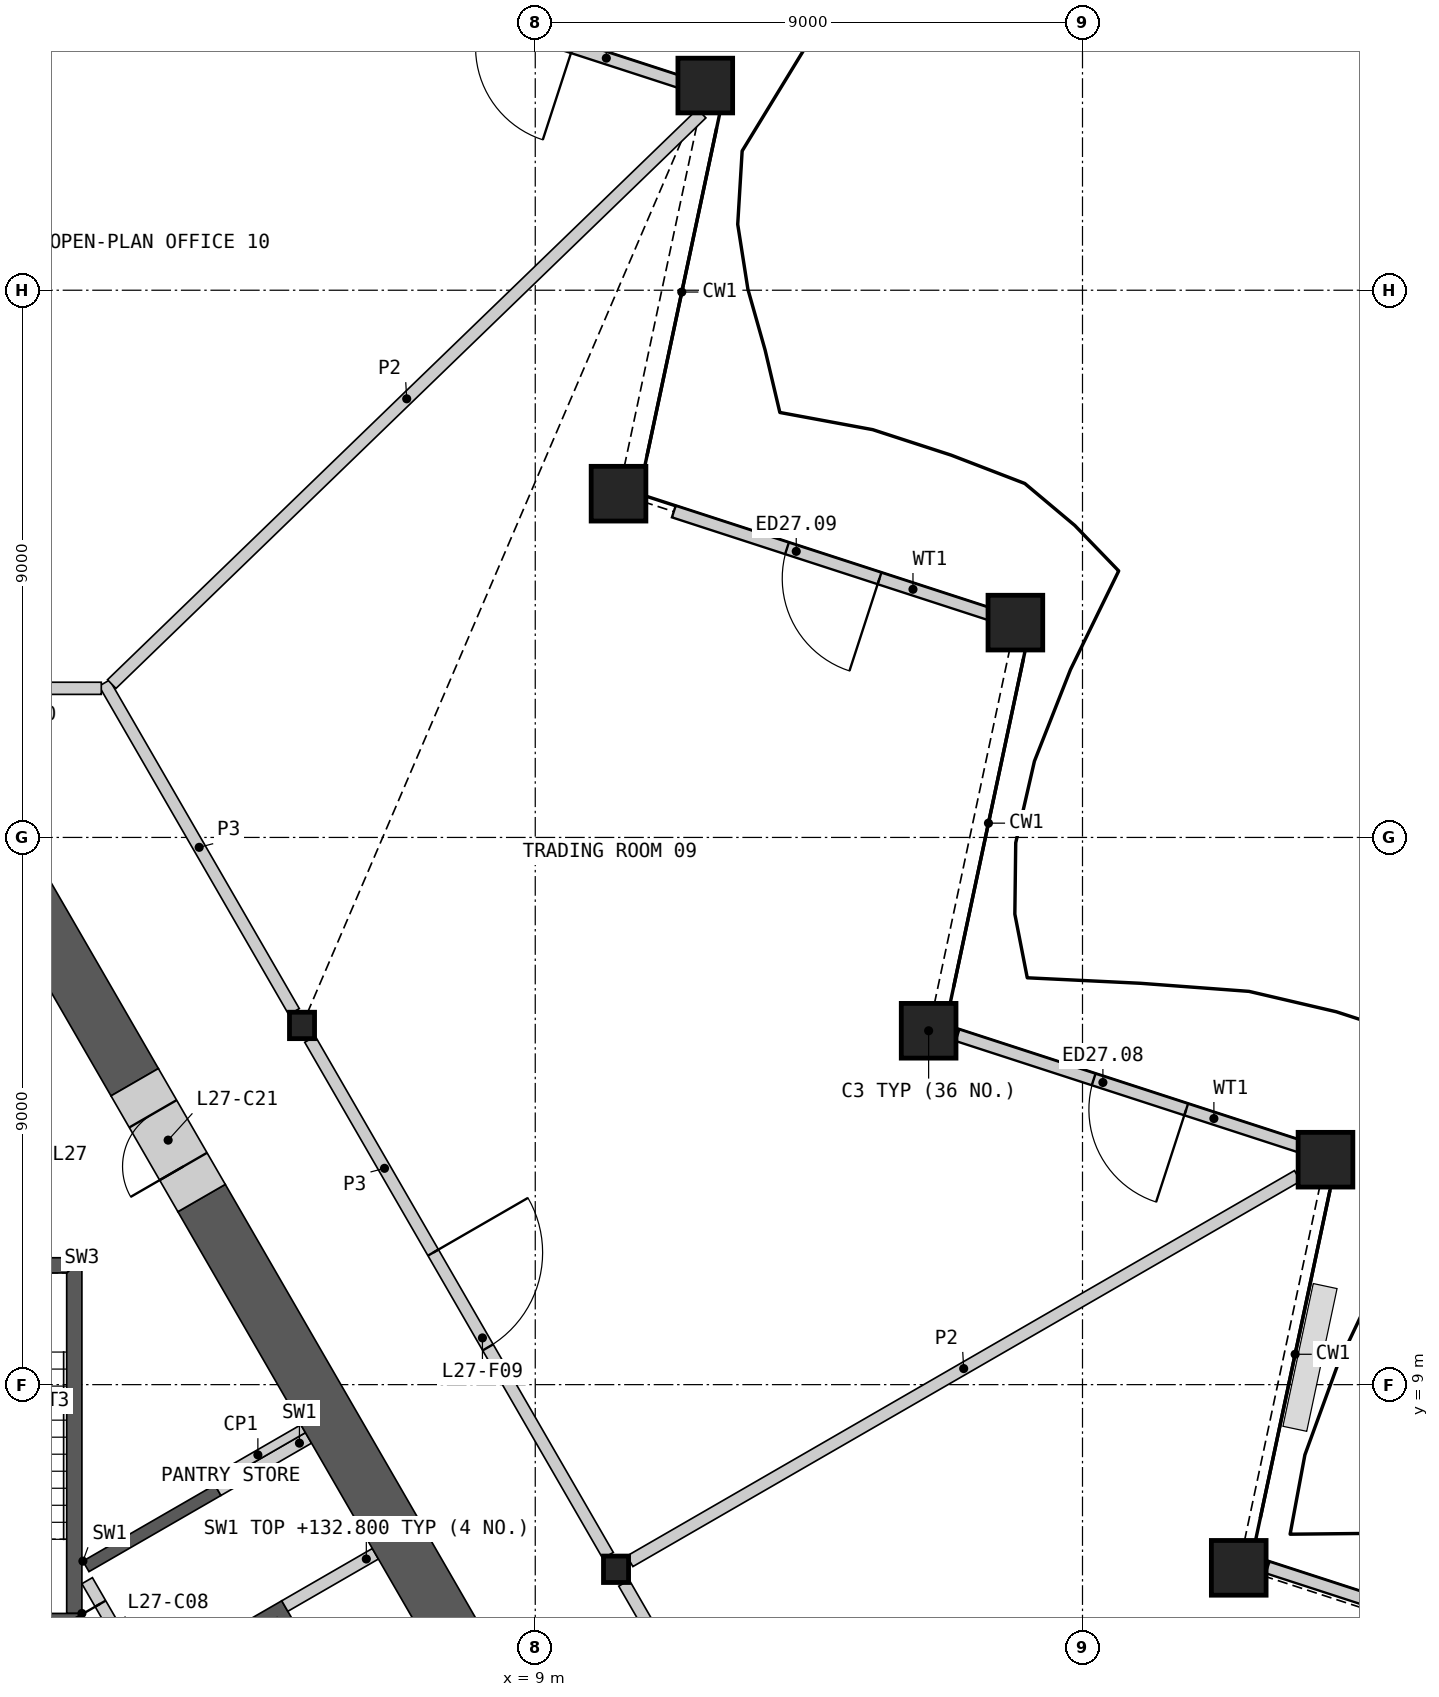
"""IFC4 building model, lengths in metres.
Left out: names, types, materials, properties, quantities, classifications, styles, units other than length and angle.
Written with IfcOpenShell. Run it as: python <this file> out.ifc"""

import sys

from ifc_helpers import new_model, si_unit, direction, frame, frame_2d, origin, origin_2d, place, context, subcontext, project, spatial, polyline, rectangle, hollow_rectangle, i_section, outline, extrude, element, fill, save


model = new_model("IFC4")
c1 = context("Model", 3, precision=1e-05, world=origin(), true_north=direction((0.0, 1.0)))
c2 = subcontext(c1, "Body", "Model", "MODEL_VIEW")
j1 = project(units=[si_unit("LENGTHUNIT", "METRE"), si_unit("PLANEANGLEUNIT", "RADIAN")], contexts=[c1])
p1 = place(None, origin())
s1 = spatial("IfcSite", under=j1, at=p1, CompositionType="ELEMENT")
p2 = place(p1, origin())
s2 = spatial("IfcBuilding", under=s1, at=p2, CompositionType="ELEMENT")
p3 = place(p2, frame((0.0, 0.0, 129.0)))
s3 = spatial("IfcBuildingStorey", under=s2, at=p3, CompositionType="ELEMENT", Elevation=129.0)
for number, where, z_axis, x_axis in (
    (1, (20.57, 5.987, 0.0), (0.0, 0.0, 1.0), (1.0, 0.0, 0.0)),
    (2, (21.996, 12.699, 0.0), (0.0, 0.0, 1.0), (1.0, 0.0, 0.0)),
    (3, (15.469, 14.82, 0.0), (0.0, 0.0, 1.0), (1.0, 0.0, 0.0)),
    (4, (16.896, 21.533, 0.0), (0.0, 0.0, 1.0), (1.0, 0.0, 0.0)),
    (5, (10.37, 23.654, 0.0), (0.0, 0.0, 1.0), (1.0, 0.0, 0.0)),
    (6, (11.796, 30.366, 0.0), (0.0, 0.0, 1.0), (1.0, 0.0, 0.0)),
):
    element("IfcColumn", number, at=place(p3, frame(where, z_axis=z_axis, x_axis=x_axis)), inside=s3, PredefinedType="COLUMN", context=c2, shape_type="SweptSolid", body=[
        extrude(hollow_rectangle(XDim=0.9, YDim=0.9, WallThickness=0.06, at=origin_2d()), origin(), (0.0, 0.0, 1.0), 4.2),
    ])
for number, where, z_axis, x_axis in (
    (7, (10.328, 5.963, 0.0), (0.0, 0.0, 1.0), (1.0, 0.0, 0.0)),
    (8, (5.164, 14.908, 0.0), (0.0, 0.0, 1.0), (1.0, 0.0, 0.0)),
):
    element("IfcColumn", number, at=place(p3, frame(where, z_axis=z_axis, x_axis=x_axis)), inside=s3, PredefinedType="COLUMN", context=c2, shape_type="SweptSolid", body=[
        extrude(i_section(OverallWidth=0.412, OverallDepth=0.435, WebThickness=0.036, FlangeThickness=0.057, at=origin_2d()), origin(), (0.0, 0.0, 1.0), 4.2),
    ])
p4 = place(p3, frame((26.622, 4.181, 0.0), z_axis=(0.0, 0.0, 1.0), x_axis=(-0.951053952554, 0.309024884649, 0.0)))
e9 = element("IfcWall", 9, at=p4, inside=s3, PredefinedType="SOLIDWALL", context=c2, shape_type="SweptSolid", body=[
    extrude(rectangle(XDim=5.865, YDim=0.2, at=frame_2d((2.932, 0.0))), origin(), (0.0, 0.0, 1.0), 3.189),
])
p5 = place(p4, frame((1.969, 0.0, 0.0)))
e10 = element("IfcOpeningElement", 10, at=p5, cuts=e9, PredefinedType="OPENING", context=c2, shape_type="SweptSolid", body=[
    extrude(rectangle(XDim=1.6, YDim=2.4, at=frame_2d((0.8, 1.2))), frame((0.0, 0.11, 0.0), z_axis=(0.0, -1.0, 0.0), x_axis=(1.0, 0.0, 0.0)), (0.0, 0.0, 1.0), 0.22),
])
p6 = place(p3, frame((21.567, 12.92, 0.0), z_axis=(0.0, 0.0, 1.0), x_axis=(-0.951051366173, 0.309032844373, 0.0)))
e11 = element("IfcWall", 11, at=p6, inside=s3, PredefinedType="SOLIDWALL", context=c2, shape_type="SweptSolid", body=[
    extrude(rectangle(XDim=5.912, YDim=0.2, at=frame_2d((2.956, 0.0))), origin(), (0.0, 0.0, 1.0), 3.189),
])
p7 = place(p6, frame((1.957, 0.0, 0.0)))
e12 = element("IfcOpeningElement", 12, at=p7, cuts=e11, PredefinedType="OPENING", context=c2, shape_type="SweptSolid", body=[
    extrude(rectangle(XDim=1.6, YDim=2.4, at=frame_2d((0.8, 1.2))), frame((0.0, 0.11, 0.0), z_axis=(0.0, -1.0, 0.0), x_axis=(1.0, 0.0, 0.0)), (0.0, 0.0, 1.0), 0.22),
])
p8 = place(p3, frame((16.523, 21.655, 0.0), z_axis=(0.0, 0.0, 1.0), x_axis=(-0.951055539332, 0.309020001142, 0.0)))
e13 = element("IfcWall", 13, at=p8, inside=s3, PredefinedType="SOLIDWALL", context=c2, shape_type="SweptSolid", body=[
    extrude(rectangle(XDim=5.515, YDim=0.2, at=frame_2d((2.757, 0.0))), origin(), (0.0, 0.0, 1.0), 3.189),
])
p9 = place(p8, frame((1.957, 0.0, 0.0)))
e14 = element("IfcOpeningElement", 14, at=p9, cuts=e13, PredefinedType="OPENING", context=c2, shape_type="SweptSolid", body=[
    extrude(rectangle(XDim=1.6, YDim=2.4, at=frame_2d((0.8, 1.2))), frame((0.0, 0.11, 0.0), z_axis=(0.0, -1.0, 0.0), x_axis=(1.0, 0.0, 0.0)), (0.0, 0.0, 1.0), 0.22),
])
p10 = place(p3, frame((11.48, 30.391, 0.0), z_axis=(0.0, 0.0, 1.0), x_axis=(-0.951055539332, 0.309020001142, 0.0)))
e15 = element("IfcWall", 15, at=p10, inside=s3, PredefinedType="SOLIDWALL", context=c2, shape_type="SweptSolid", body=[
    extrude(rectangle(XDim=5.515, YDim=0.2, at=frame_2d((2.757, 0.0))), origin(), (0.0, 0.0, 1.0), 3.189),
])
p11 = place(p10, frame((1.957, 0.0, 0.0)))
e16 = element("IfcOpeningElement", 16, at=p11, cuts=e15, PredefinedType="OPENING", context=c2, shape_type="SweptSolid", body=[
    extrude(rectangle(XDim=1.6, YDim=2.4, at=frame_2d((0.8, 1.2))), frame((0.0, 0.11, 0.0), z_axis=(0.0, -1.0, 0.0), x_axis=(1.0, 0.0, 0.0)), (0.0, 0.0, 1.0), 0.22),
])
p12 = place(p3, origin())
e17 = element("IfcWall", 17, at=p12, inside=s3, PredefinedType="SHEAR", context=c2, shape_type="SweptSolid", body=[
    extrude(outline(polyline([(1.561, 6.097), (3.731, 7.35), (3.831, 7.177), (1.66, 5.924), (1.561, 6.097)])), origin(), (0.0, 0.0, 1.0), 3.8),
])
p13 = place(p3, origin())
e18 = element("IfcWall", 18, at=p13, inside=s3, PredefinedType="SHEAR", context=c2, shape_type="SweptSolid", body=[
    extrude(outline(polyline([(2.66, 4.192), (4.831, 5.445), (8.231, -0.444), (6.061, -1.697), (5.96, -1.524), (7.952, -0.374), (6.952, 1.358), (4.96, 0.208), (4.861, 0.381), (6.852, 1.531), (5.852, 3.263), (3.861, 2.113), (3.76, 2.287), (5.752, 3.437), (4.752, 5.169), (2.76, 4.019), (2.66, 4.192)])), origin(), (0.0, 0.0, 1.0), 3.8),
])
p14 = place(p3, frame((5.817, -1.476, 0.0), z_axis=(0.0, 0.0, 1.0), x_axis=(-0.500002616675, 0.866023893041, 0.0)))
e19 = element("IfcWall", 19, at=p14, inside=s3, PredefinedType="SOLIDWALL", context=c2, shape_type="SweptSolid", body=[
    extrude(rectangle(XDim=8.373, YDim=0.2, at=frame_2d((4.187, 0.0))), origin(), (0.0, 0.0, 1.0), 3.8),
])
p15 = place(p14, frame((0.337, 0.0, 0.0)))
e20 = element("IfcOpeningElement", 20, at=p15, cuts=e19, PredefinedType="OPENING", context=c2, shape_type="SweptSolid", body=[
    extrude(rectangle(XDim=1.1, YDim=2.1, at=frame_2d((0.55, 1.05))), frame((0.0, 0.11, 0.0), z_axis=(0.0, -1.0, 0.0), x_axis=(1.0, 0.0, 0.0)), (0.0, 0.0, 1.0), 0.22),
])
p16 = place(p14, frame((2.537, 0.0, 0.0)))
e21 = element("IfcOpeningElement", 21, at=p16, cuts=e19, PredefinedType="OPENING", context=c2, shape_type="SweptSolid", body=[
    extrude(rectangle(XDim=1.1, YDim=2.1, at=frame_2d((0.55, 1.05))), frame((0.0, 0.11, 0.0), z_axis=(0.0, -1.0, 0.0), x_axis=(1.0, 0.0, 0.0)), (0.0, 0.0, 1.0), 0.22),
])
p17 = place(p14, frame((4.737, 0.0, 0.0)))
e22 = element("IfcOpeningElement", 22, at=p17, cuts=e19, PredefinedType="OPENING", context=c2, shape_type="SweptSolid", body=[
    extrude(rectangle(XDim=1.1, YDim=2.1, at=frame_2d((0.55, 1.05))), frame((0.0, 0.11, 0.0), z_axis=(0.0, -1.0, 0.0), x_axis=(1.0, 0.0, 0.0)), (0.0, 0.0, 1.0), 0.22),
])
p18 = place(p14, frame((7.037, 0.0, 0.0)))
e23 = element("IfcOpeningElement", 23, at=p18, cuts=e19, PredefinedType="OPENING", context=c2, shape_type="SweptSolid", body=[
    extrude(rectangle(XDim=0.9, YDim=2.1, at=frame_2d((0.45, 1.05))), frame((0.0, 0.11, 0.0), z_axis=(0.0, -1.0, 0.0), x_axis=(1.0, 0.0, 0.0)), (0.0, 0.0, 1.0), 0.22),
])
for number, where, z_axis, x_axis in (
    (24, (4.881, 5.358, 0.0), (0.0, 0.0, 1.0), (0.866, 0.5, 0.0)),
    (25, (3.781, 7.263, 0.0), (0.0, 0.0, 1.0), (0.866, 0.5, 0.0)),
):
    element("IfcWall", number, at=place(p3, frame(where, z_axis=z_axis, x_axis=x_axis)), inside=s3, PredefinedType="SHEAR", context=c2, shape_type="SweptSolid", body=[
        extrude(rectangle(XDim=1.72, YDim=0.2, at=frame_2d((0.86, 0.0))), origin(), (0.0, 0.0, 1.0), 3.8),
    ])
p19 = place(p3, origin())
e26 = element("IfcWall", 26, at=p19, inside=s3, PredefinedType="SHEAR", context=c2, shape_type="SweptSolid", body=[
    extrude(outline(polyline([(1.544, 5.237), (1.544, 11.087), (1.294, 10.837), (1.294, 5.237), (1.544, 5.237)])), origin(), (0.0, 0.0, 1.0), 3.8),
])
p20 = place(p3, origin())
e27 = element("IfcWall", 27, at=p20, inside=s3, PredefinedType="SHEAR", context=c2, shape_type="SweptSolid", body=[
    extrude(outline(polyline([(1.544, 11.087), (-1.544, 11.087), (-1.294, 10.837), (1.294, 10.837), (1.544, 11.087)])), origin(), (0.0, 0.0, 1.0), 3.8),
])
p21 = place(p3, frame((1.544, 5.112, 0.0), z_axis=(0.0, 0.0, 1.0), x_axis=(-1.0, 0.0, 0.0)))
e28 = element("IfcWall", 28, at=p21, inside=s3, PredefinedType="SHEAR", context=c2, shape_type="SweptSolid", body=[
    extrude(rectangle(XDim=3.088, YDim=0.25, at=frame_2d((1.544, 0.0))), origin(), (0.0, 0.0, 1.0), 3.8),
])
p22 = place(p21, frame((0.994, 0.0, 0.0)))
e29 = element("IfcOpeningElement", 29, at=p22, cuts=e28, PredefinedType="OPENING", context=c2, shape_type="SweptSolid", body=[
    extrude(rectangle(XDim=1.1, YDim=2.1, at=frame_2d((0.55, 1.05))), frame((0.0, 0.135, 0.0), z_axis=(0.0, -1.0, 0.0), x_axis=(1.0, 0.0, 0.0)), (0.0, 0.0, 1.0), 0.27),
])
p23 = place(p3, frame((3.693, 7.415, 0.0), z_axis=(0.0, 0.0, 1.0), x_axis=(0.866024871741, 0.500000921525, 0.0)))
e30 = element("IfcWall", 30, at=p23, inside=s3, PredefinedType="PARTITIONING", context=c2, shape_type="SweptSolid", body=[
    extrude(rectangle(XDim=1.72, YDim=0.15, at=frame_2d((0.86, 0.0))), origin(), (0.0, 0.0, 1.0), 3.8),
])
p24 = place(p3, frame((7.91, 4.451, 0.0), z_axis=(0.0, 0.0, 1.0), x_axis=(-0.500001962043, 0.866024270995, 0.0)))
e31 = element("IfcWall", 31, at=p24, inside=s3, PredefinedType="SHEAR", context=c2, shape_type="SweptSolid", body=[
    extrude(rectangle(XDim=8.796, YDim=0.9, at=frame_2d((4.398, 0.0))), origin(), (0.0, 0.0, 1.0), 3.8),
])
p25 = place(p3, frame((2.413, 13.974, 0.0), z_axis=(0.0, 0.0, 1.0), x_axis=(-0.500046330384, 0.865998653272, 0.0)))
e32 = element("IfcWall", 32, at=p25, inside=s3, PredefinedType="SHEAR", context=c2, shape_type="SweptSolid", body=[
    extrude(rectangle(XDim=4.045, YDim=0.9, at=frame_2d((2.023, 0.0))), origin(), (0.0, 0.0, 1.0), 3.8),
])
p26 = place(p3, frame((3.512, 12.069, 0.0), z_axis=(0.0, 0.0, 1.0), x_axis=(-0.499946605688, 0.86605622881, 0.0)))
e33 = element("IfcWall", 33, at=p26, inside=s3, PredefinedType="SHEAR", context=c2, shape_type="SweptSolid", body=[
    extrude(rectangle(XDim=2.2, YDim=0.9, at=frame_2d((1.1, 0.0))), origin(), (0.0, 0.0, 1.0), 3.8),
])
p27 = place(p26, frame((0.6, 0.0, 0.0)))
e34 = element("IfcOpeningElement", 34, at=p27, cuts=e33, PredefinedType="OPENING", context=c2, shape_type="SweptSolid", body=[
    extrude(rectangle(XDim=1.0, YDim=2.1, at=frame_2d((0.5, 1.05))), frame((0.0, 0.46, 0.0), z_axis=(0.0, -1.0, 0.0), x_axis=(1.0, 0.0, 0.0)), (0.0, 0.0, 1.0), 0.92),
])
p28 = place(p3, frame((10.46, 5.736, 0.0), z_axis=(0.0, 0.0, 1.0), x_axis=(0.500004141693, -0.866023012564, 0.0)))
e35 = element("IfcWall", 35, at=p28, inside=s3, PredefinedType="PARTITIONING", context=c2, shape_type="SweptSolid", body=[
    extrude(rectangle(XDim=9.803, YDim=0.2, at=frame_2d((4.902, 0.0))), origin(), (0.0, 0.0, 1.0), 3.8),
])
p29 = place(p28, frame((4.352, 0.0, 0.0)))
e36 = element("IfcOpeningElement", 36, at=p29, cuts=e35, PredefinedType="OPENING", context=c2, shape_type="SweptSolid", body=[
    extrude(rectangle(XDim=1.0, YDim=2.1, at=frame_2d((0.5, 1.05))), frame((0.0, 0.11, 0.0), z_axis=(0.0, -1.0, 0.0), x_axis=(1.0, 0.0, 0.0)), (0.0, 0.0, 1.0), 0.22),
])
p30 = place(p3, frame((5.295, 14.68, 0.0), z_axis=(0.0, 0.0, 1.0), x_axis=(0.500012035596, -0.866018454918, 0.0)))
e37 = element("IfcWall", 37, at=p30, inside=s3, PredefinedType="PARTITIONING", context=c2, shape_type="SweptSolid", body=[
    extrude(rectangle(XDim=9.803, YDim=0.2, at=frame_2d((4.902, 0.0))), origin(), (0.0, 0.0, 1.0), 3.8),
])
p31 = place(p30, frame((4.052, 0.0, 0.0)))
e38 = element("IfcOpeningElement", 38, at=p31, cuts=e37, PredefinedType="OPENING", context=c2, shape_type="SweptSolid", body=[
    extrude(rectangle(XDim=1.8, YDim=2.1, at=frame_2d((0.9, 1.05))), frame((0.0, 0.11, 0.0), z_axis=(0.0, -1.0, 0.0), x_axis=(1.0, 0.0, 0.0)), (0.0, 0.0, 1.0), 0.22),
])
p32 = place(p3, frame((1.913, 20.539, 0.0), z_axis=(0.0, 0.0, 1.0), x_axis=(0.499980978912, -0.866036385336, 0.0)))
e39 = element("IfcWall", 39, at=p32, inside=s3, PredefinedType="PARTITIONING", context=c2, shape_type="SweptSolid", body=[
    extrude(rectangle(XDim=6.24, YDim=0.2, at=frame_2d((3.12, 0.0))), origin(), (0.0, 0.0, 1.0), 3.8),
])
p33 = place(p3, frame((-1.863, 20.453, 0.0), z_axis=(0.0, 0.0, 1.0), x_axis=(1.0, 0.0, 0.0)))
e40 = element("IfcWall", 40, at=p33, inside=s3, PredefinedType="PARTITIONING", context=c2, shape_type="SweptSolid", body=[
    extrude(rectangle(XDim=3.726, YDim=0.2, at=frame_2d((1.863, 0.0))), origin(), (0.0, 0.0, 1.0), 3.8),
])
p34 = place(p33, frame((0.963, 0.0, 0.0)))
e41 = element("IfcOpeningElement", 41, at=p34, cuts=e40, PredefinedType="OPENING", context=c2, shape_type="SweptSolid", body=[
    extrude(rectangle(XDim=1.8, YDim=2.1, at=frame_2d((0.9, 1.05))), frame((0.0, 0.11, 0.0), z_axis=(0.0, -1.0, 0.0), x_axis=(1.0, 0.0, 0.0)), (0.0, 0.0, 1.0), 0.22),
])
p35 = place(p3, frame((2.035, 20.522, 0.0), z_axis=(0.0, 0.0, 1.0), x_axis=(0.718783474817, 0.695234001132, 0.0)))
e42 = element("IfcWall", 42, at=p35, inside=s3, PredefinedType="PARTITIONING", context=c2, shape_type="SweptSolid", body=[
    extrude(rectangle(XDim=13.498, YDim=0.2, at=frame_2d((6.749, 0.0))), origin(), (0.0, 0.0, 1.0), 2.885),
])
p36 = place(p3, frame((10.556, 6.094, 0.0), z_axis=(0.0, 0.0, 1.0), x_axis=(0.86602461759, 0.500001361726, 0.0)))
e43 = element("IfcWall", 43, at=p36, inside=s3, PredefinedType="PARTITIONING", context=c2, shape_type="SweptSolid", body=[
    extrude(rectangle(XDim=12.679, YDim=0.2, at=frame_2d((6.34, 0.0))), origin(), (0.0, 0.0, 1.0), 2.885),
])
p37 = place(p7, origin())
e44 = element("IfcDoor", 44, at=p37, inside=s3, OperationType="DOUBLE_DOOR_SINGLE_SWING", PredefinedType="DOOR", context=c2, shape_type="SweptSolid", body=[
    extrude(rectangle(XDim=1.6, YDim=2.4, at=frame_2d((0.8, 1.2))), frame((0.0, 0.025, 0.0), z_axis=(0.0, -1.0, 0.0), x_axis=(1.0, 0.0, 0.0)), (0.0, 0.0, 1.0), 0.05),
])
fill(e12, e44)
p38 = place(p9, origin())
e45 = element("IfcDoor", 45, at=p38, inside=s3, OperationType="DOUBLE_DOOR_SINGLE_SWING", PredefinedType="DOOR", context=c2, shape_type="SweptSolid", body=[
    extrude(rectangle(XDim=1.6, YDim=2.4, at=frame_2d((0.8, 1.2))), frame((0.0, 0.025, 0.0), z_axis=(0.0, -1.0, 0.0), x_axis=(1.0, 0.0, 0.0)), (0.0, 0.0, 1.0), 0.05),
])
fill(e14, e45)
p39 = place(p18, origin())
e46 = element("IfcDoor", 46, at=p39, inside=s3, OperationType="SINGLE_SWING_RIGHT", PredefinedType="DOOR", context=c2, shape_type="SweptSolid", body=[
    extrude(rectangle(XDim=0.9, YDim=2.1, at=frame_2d((0.45, 1.05))), frame((0.0, 0.025, 0.0), z_axis=(0.0, -1.0, 0.0), x_axis=(1.0, 0.0, 0.0)), (0.0, 0.0, 1.0), 0.05),
])
fill(e23, e46)
p40 = place(p27, origin())
e47 = element("IfcDoor", 47, at=p40, inside=s3, OperationType="SINGLE_SWING_LEFT", PredefinedType="DOOR", context=c2, shape_type="SweptSolid", body=[
    extrude(rectangle(XDim=1.0, YDim=2.1, at=frame_2d((0.5, 1.05))), frame((0.0, 0.205, 0.0), z_axis=(0.0, -1.0, 0.0), x_axis=(1.0, 0.0, 0.0)), (0.0, 0.0, 1.0), 0.05),
])
fill(e34, e47)
p41 = place(p31, origin())
e48 = element("IfcDoor", 48, at=p41, inside=s3, OperationType="DOUBLE_DOOR_SINGLE_SWING", PredefinedType="DOOR", context=c2, shape_type="SweptSolid", body=[
    extrude(rectangle(XDim=1.8, YDim=2.1, at=frame_2d((0.9, 1.05))), frame((0.0, 0.025, 0.0), z_axis=(0.0, -1.0, 0.0), x_axis=(1.0, 0.0, 0.0)), (0.0, 0.0, 1.0), 0.05),
])
fill(e38, e48)
save(model, sys.argv[1])
